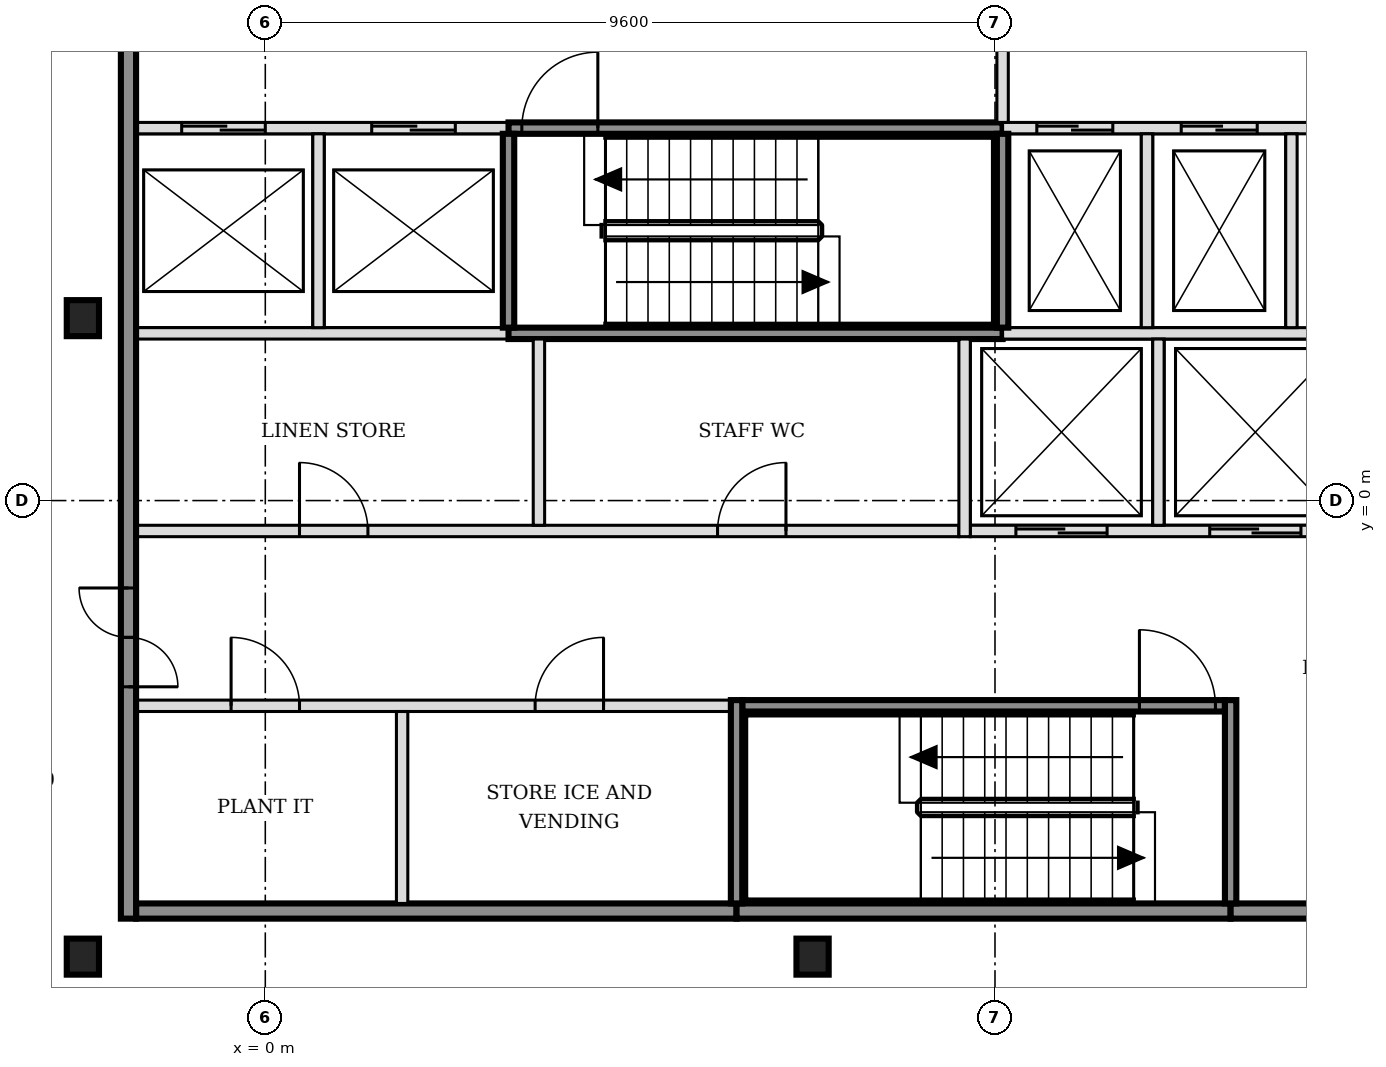
"""IFC4 building model, lengths in metres.
Left out: names, types, materials, properties, quantities, classifications, styles, units other than length and angle.
Written with IfcOpenShell. Run it as: python <this file> out.ifc"""

import sys

from ifc_helpers import new_model, si_unit, direction, frame, frame_2d, origin, origin_2d, place, context, subcontext, project, spatial, rectangle, i_section, extrude, element, fill, save


model = new_model("IFC4")
c1 = context("Model", 3, precision=1e-05, world=origin(), true_north=direction((0.0, 1.0)))
c2 = subcontext(c1, "Body", "Model", "MODEL_VIEW")
j1 = project(units=[si_unit("LENGTHUNIT", "METRE"), si_unit("PLANEANGLEUNIT", "RADIAN")], contexts=[c1])
p1 = place(None, origin())
s1 = spatial("IfcSite", under=j1, at=p1, CompositionType="ELEMENT")
p2 = place(p1, origin())
s2 = spatial("IfcBuilding", under=s1, at=p2, CompositionType="ELEMENT")
p3 = place(p2, frame((0.0, 0.0, 136.2)))
s3 = spatial("IfcBuildingStorey", under=s2, at=p3, CompositionType="ELEMENT", Elevation=136.2)
for number, where, z_axis, x_axis in (
    (1, (-2.4, -6.0, -0.15), (0.0, 0.0, 1.0), (1.0, 0.0, 0.0)),
    (2, (7.2, -6.0, -0.15), (0.0, 0.0, 1.0), (1.0, 0.0, 0.0)),
    (3, (-2.4, 2.4, -0.15), (0.0, 0.0, 1.0), (1.0, 0.0, 0.0)),
):
    element("IfcColumn", number, at=place(p3, frame(where, z_axis=z_axis, x_axis=x_axis)), inside=s3, PredefinedType="COLUMN", context=c2, shape_type="SweptSolid", body=[
        extrude(i_section(OverallWidth=0.424, OverallDepth=0.474, WebThickness=0.048, FlangeThickness=0.077, FilletRadius=0.015, at=origin_2d()), origin(), (0.0, 0.0, 1.0), 3.6),
    ])
p4 = place(p3, frame((-1.7, -5.4, 0.0), z_axis=(0.0, 0.0, 1.0), x_axis=(1.0, 0.0, 0.0)))
e4 = element("IfcWall", 4, at=p4, inside=s3, PredefinedType="SOLIDWALL", context=c2, shape_type="SweptSolid", body=[
    extrude(rectangle(XDim=7.9, YDim=0.2, at=frame_2d((3.95, 0.0))), origin(), (0.0, 0.0, 1.0), 3.45),
])
p5 = place(p3, frame((6.2, -5.4, 0.0), z_axis=(0.0, 0.0, 1.0), x_axis=(1.0, 0.0, 0.0)))
e5 = element("IfcWall", 5, at=p5, inside=s3, PredefinedType="SOLIDWALL", context=c2, shape_type="SweptSolid", body=[
    extrude(rectangle(XDim=6.5, YDim=0.2, at=frame_2d((3.25, 0.0))), origin(), (0.0, 0.0, 1.0), 3.45),
])
p6 = place(p3, frame((12.7, -5.4, 0.0), z_axis=(0.0, 0.0, 1.0), x_axis=(1.0, 0.0, 0.0)))
e6 = element("IfcWall", 6, at=p6, inside=s3, PredefinedType="SOLIDWALL", context=c2, shape_type="SweptSolid", body=[
    extrude(rectangle(XDim=3.4, YDim=0.2, at=frame_2d((1.7, 0.0))), origin(), (0.0, 0.0, 1.0), 3.45),
])
p7 = place(p3, frame((-1.7, -2.7, 0.0), z_axis=(0.0, 0.0, 1.0), x_axis=(1.0, 0.0, 0.0)))
e7 = element("IfcWall", 7, at=p7, inside=s3, PredefinedType="PARTITIONING", context=c2, shape_type="SweptSolid", body=[
    extrude(rectangle(XDim=7.825, YDim=0.15, at=frame_2d((3.913, 0.0))), origin(), (0.0, 0.0, 1.0), 3.45),
])
p8 = place(p7, frame((1.25, 0.0, 0.0)))
e8 = element("IfcOpeningElement", 8, at=p8, cuts=e7, PredefinedType="OPENING", context=c2, shape_type="SweptSolid", body=[
    extrude(rectangle(XDim=0.9, YDim=2.1, at=frame_2d((0.45, 1.05))), frame((0.0, 0.085, 0.0), z_axis=(0.0, -1.0, 0.0), x_axis=(1.0, 0.0, 0.0)), (0.0, 0.0, 1.0), 0.17),
])
p9 = place(p7, frame((5.25, 0.0, 0.0)))
e9 = element("IfcOpeningElement", 9, at=p9, cuts=e7, PredefinedType="OPENING", context=c2, shape_type="SweptSolid", body=[
    extrude(rectangle(XDim=0.9, YDim=2.1, at=frame_2d((0.45, 1.05))), frame((0.0, 0.085, 0.0), z_axis=(0.0, -1.0, 0.0), x_axis=(1.0, 0.0, 0.0)), (0.0, 0.0, 1.0), 0.17),
])
p10 = place(p3, frame((6.275, -2.7, 0.0), z_axis=(0.0, 0.0, 1.0), x_axis=(1.0, 0.0, 0.0)))
e10 = element("IfcWall", 10, at=p10, inside=s3, PredefinedType="SOLIDWALL", context=c2, shape_type="SweptSolid", body=[
    extrude(rectangle(XDim=6.35, YDim=0.15, at=frame_2d((3.175, 0.0))), origin(), (0.0, 0.0, 1.0), 3.45),
])
p11 = place(p10, frame((5.225, 0.0, 0.0)))
e11 = element("IfcOpeningElement", 11, at=p11, cuts=e10, PredefinedType="OPENING", context=c2, shape_type="SweptSolid", body=[
    extrude(rectangle(XDim=1.0, YDim=2.1, at=frame_2d((0.5, 1.05))), frame((0.0, 0.085, 0.0), z_axis=(0.0, -1.0, 0.0), x_axis=(1.0, 0.0, 0.0)), (0.0, 0.0, 1.0), 0.17),
])
p12 = place(p3, frame((-1.7, -0.4, 0.0), z_axis=(0.0, 0.0, 1.0), x_axis=(1.0, 0.0, 0.0)))
e12 = element("IfcWall", 12, at=p12, inside=s3, PredefinedType="PARTITIONING", context=c2, shape_type="SweptSolid", body=[
    extrude(rectangle(XDim=10.825, YDim=0.15, at=frame_2d((5.413, 0.0))), origin(), (0.0, 0.0, 1.0), 3.45),
])
p13 = place(p12, frame((2.15, 0.0, 0.0)))
e13 = element("IfcOpeningElement", 13, at=p13, cuts=e12, PredefinedType="OPENING", context=c2, shape_type="SweptSolid", body=[
    extrude(rectangle(XDim=0.9, YDim=2.1, at=frame_2d((0.45, 1.05))), frame((0.0, 0.085, 0.0), z_axis=(0.0, -1.0, 0.0), x_axis=(1.0, 0.0, 0.0)), (0.0, 0.0, 1.0), 0.17),
])
p14 = place(p12, frame((7.65, 0.0, 0.0)))
e14 = element("IfcOpeningElement", 14, at=p14, cuts=e12, PredefinedType="OPENING", context=c2, shape_type="SweptSolid", body=[
    extrude(rectangle(XDim=0.9, YDim=2.1, at=frame_2d((0.45, 1.05))), frame((0.0, 0.085, 0.0), z_axis=(0.0, -1.0, 0.0), x_axis=(1.0, 0.0, 0.0)), (0.0, 0.0, 1.0), 0.17),
])
p15 = place(p3, frame((9.275, -0.4, 0.0), z_axis=(0.0, 0.0, 1.0), x_axis=(1.0, 0.0, 0.0)))
e15 = element("IfcWall", 15, at=p15, inside=s3, PredefinedType="SOLIDWALL", context=c2, shape_type="SweptSolid", body=[
    extrude(rectangle(XDim=4.95, YDim=0.15, at=frame_2d((2.475, 0.0))), origin(), (0.0, 0.0, 1.0), 3.45),
])
p16 = place(p15, frame((0.6, 0.0, 0.0)))
e16 = element("IfcOpeningElement", 16, at=p16, cuts=e15, PredefinedType="OPENING", context=c2, shape_type="SweptSolid", body=[
    extrude(rectangle(XDim=1.2, YDim=2.1, at=frame_2d((0.6, 1.05))), frame((0.0, 0.085, 0.0), z_axis=(0.0, -1.0, 0.0), x_axis=(1.0, 0.0, 0.0)), (0.0, 0.0, 1.0), 0.17),
])
p17 = place(p15, frame((3.15, 0.0, 0.0)))
e17 = element("IfcOpeningElement", 17, at=p17, cuts=e15, PredefinedType="OPENING", context=c2, shape_type="SweptSolid", body=[
    extrude(rectangle(XDim=1.2, YDim=2.1, at=frame_2d((0.6, 1.05))), frame((0.0, 0.085, 0.0), z_axis=(0.0, -1.0, 0.0), x_axis=(1.0, 0.0, 0.0)), (0.0, 0.0, 1.0), 0.17),
])
p18 = place(p3, frame((-1.7, 2.2, 0.0), z_axis=(0.0, 0.0, 1.0), x_axis=(1.0, 0.0, 0.0)))
e18 = element("IfcWall", 18, at=p18, inside=s3, PredefinedType="SOLIDWALL", context=c2, shape_type="SweptSolid", body=[
    extrude(rectangle(XDim=4.9, YDim=0.15, at=frame_2d((2.45, 0.0))), origin(), (0.0, 0.0, 1.0), 3.45),
])
p19 = place(p3, frame((3.2, 2.2, 0.0), z_axis=(0.0, 0.0, 1.0), x_axis=(1.0, 0.0, 0.0)))
e19 = element("IfcWall", 19, at=p19, inside=s3, PredefinedType="SOLIDWALL", context=c2, shape_type="SweptSolid", body=[
    extrude(rectangle(XDim=6.5, YDim=0.15, at=frame_2d((3.25, 0.0))), origin(), (0.0, 0.0, 1.0), 3.45),
])
p20 = place(p3, frame((9.7, 2.2, 0.0), z_axis=(0.0, 0.0, 1.0), x_axis=(1.0, 0.0, 0.0)))
e20 = element("IfcWall", 20, at=p20, inside=s3, PredefinedType="SOLIDWALL", context=c2, shape_type="SweptSolid", body=[
    extrude(rectangle(XDim=4.525, YDim=0.15, at=frame_2d((2.263, 0.0))), origin(), (0.0, 0.0, 1.0), 3.45),
])
p21 = place(p3, frame((-1.7, 4.9, 0.0), z_axis=(0.0, 0.0, 1.0), x_axis=(1.0, 0.0, 0.0)))
e21 = element("IfcWall", 21, at=p21, inside=s3, PredefinedType="SOLIDWALL", context=c2, shape_type="SweptSolid", body=[
    extrude(rectangle(XDim=4.9, YDim=0.15, at=frame_2d((2.45, 0.0))), origin(), (0.0, 0.0, 1.0), 3.45),
])
p22 = place(p21, frame((0.6, 0.0, 0.0)))
e22 = element("IfcOpeningElement", 22, at=p22, cuts=e21, PredefinedType="OPENING", context=c2, shape_type="SweptSolid", body=[
    extrude(rectangle(XDim=1.1, YDim=2.1, at=frame_2d((0.55, 1.05))), frame((0.0, 0.085, 0.0), z_axis=(0.0, -1.0, 0.0), x_axis=(1.0, 0.0, 0.0)), (0.0, 0.0, 1.0), 0.17),
])
p23 = place(p21, frame((3.1, 0.0, 0.0)))
e23 = element("IfcOpeningElement", 23, at=p23, cuts=e21, PredefinedType="OPENING", context=c2, shape_type="SweptSolid", body=[
    extrude(rectangle(XDim=1.1, YDim=2.1, at=frame_2d((0.55, 1.05))), frame((0.0, 0.085, 0.0), z_axis=(0.0, -1.0, 0.0), x_axis=(1.0, 0.0, 0.0)), (0.0, 0.0, 1.0), 0.17),
])
p24 = place(p3, frame((3.2, 4.9, 0.0), z_axis=(0.0, 0.0, 1.0), x_axis=(1.0, 0.0, 0.0)))
e24 = element("IfcWall", 24, at=p24, inside=s3, PredefinedType="SOLIDWALL", context=c2, shape_type="SweptSolid", body=[
    extrude(rectangle(XDim=6.5, YDim=0.15, at=frame_2d((3.25, 0.0))), origin(), (0.0, 0.0, 1.0), 3.45),
])
p25 = place(p24, frame((0.175, 0.0, 0.0)))
e25 = element("IfcOpeningElement", 25, at=p25, cuts=e24, PredefinedType="OPENING", context=c2, shape_type="SweptSolid", body=[
    extrude(rectangle(XDim=1.0, YDim=2.1, at=frame_2d((0.5, 1.05))), frame((0.0, 0.085, 0.0), z_axis=(0.0, -1.0, 0.0), x_axis=(1.0, 0.0, 0.0)), (0.0, 0.0, 1.0), 0.17),
])
p26 = place(p3, frame((9.7, 4.9, 0.0), z_axis=(0.0, 0.0, 1.0), x_axis=(1.0, 0.0, 0.0)))
e26 = element("IfcWall", 26, at=p26, inside=s3, PredefinedType="SOLIDWALL", context=c2, shape_type="SweptSolid", body=[
    extrude(rectangle(XDim=6.4, YDim=0.15, at=frame_2d((3.2, 0.0))), origin(), (0.0, 0.0, 1.0), 3.45),
])
p27 = place(p26, frame((0.45, 0.0, 0.0)))
e27 = element("IfcOpeningElement", 27, at=p27, cuts=e26, PredefinedType="OPENING", context=c2, shape_type="SweptSolid", body=[
    extrude(rectangle(XDim=1.0, YDim=2.1, at=frame_2d((0.5, 1.05))), frame((0.0, 0.085, 0.0), z_axis=(0.0, -1.0, 0.0), x_axis=(1.0, 0.0, 0.0)), (0.0, 0.0, 1.0), 0.17),
])
p28 = place(p26, frame((2.35, 0.0, 0.0)))
e28 = element("IfcOpeningElement", 28, at=p28, cuts=e26, PredefinedType="OPENING", context=c2, shape_type="SweptSolid", body=[
    extrude(rectangle(XDim=1.0, YDim=2.1, at=frame_2d((0.5, 1.05))), frame((0.0, 0.085, 0.0), z_axis=(0.0, -1.0, 0.0), x_axis=(1.0, 0.0, 0.0)), (0.0, 0.0, 1.0), 0.17),
])
p29 = place(p26, frame((4.7, 0.0, 0.0)))
e29 = element("IfcOpeningElement", 29, at=p29, cuts=e26, PredefinedType="OPENING", context=c2, shape_type="SweptSolid", body=[
    extrude(rectangle(XDim=0.9, YDim=2.1, at=frame_2d((0.45, 1.05))), frame((0.0, 0.085, 0.0), z_axis=(0.0, -1.0, 0.0), x_axis=(1.0, 0.0, 0.0)), (0.0, 0.0, 1.0), 0.17),
])
p30 = place(p3, frame((-1.8, -5.5, 0.0), z_axis=(0.0, 0.0, 1.0), x_axis=(0.0, 1.0, 0.0)))
e30 = element("IfcWall", 30, at=p30, inside=s3, PredefinedType="SOLIDWALL", context=c2, shape_type="SweptSolid", body=[
    extrude(rectangle(XDim=15.8, YDim=0.2, at=frame_2d((7.9, 0.0))), origin(), (0.0, 0.0, 1.0), 3.45),
])
p31 = place(p30, frame((3.05, 0.0, 0.0)))
e31 = element("IfcOpeningElement", 31, at=p31, cuts=e30, PredefinedType="OPENING", context=c2, shape_type="SweptSolid", body=[
    extrude(rectangle(XDim=1.3, YDim=2.1, at=frame_2d((0.65, 1.05))), frame((0.0, 0.11, 0.0), z_axis=(0.0, -1.0, 0.0), x_axis=(1.0, 0.0, 0.0)), (0.0, 0.0, 1.0), 0.22),
])
p32 = place(p30, frame((11.45, 0.0, 0.0)))
e32 = element("IfcOpeningElement", 32, at=p32, cuts=e30, PredefinedType="OPENING", context=c2, shape_type="SweptSolid", body=[
    extrude(rectangle(XDim=1.3, YDim=2.1, at=frame_2d((0.65, 1.05))), frame((0.0, 0.11, 0.0), z_axis=(0.0, -1.0, 0.0), x_axis=(1.0, 0.0, 0.0)), (0.0, 0.0, 1.0), 0.22),
])
p33 = place(p3, frame((0.7, 2.275, 0.0), z_axis=(0.0, 0.0, 1.0), x_axis=(0.0, 1.0, 0.0)))
e33 = element("IfcWall", 33, at=p33, inside=s3, PredefinedType="SOLIDWALL", context=c2, shape_type="SweptSolid", body=[
    extrude(rectangle(XDim=2.55, YDim=0.15, at=frame_2d((1.275, 0.0))), origin(), (0.0, 0.0, 1.0), 3.45),
])
p34 = place(p3, frame((1.8, -5.3, 0.0), z_axis=(0.0, 0.0, 1.0), x_axis=(0.0, 1.0, 0.0)))
e34 = element("IfcWall", 34, at=p34, inside=s3, PredefinedType="PARTITIONING", context=c2, shape_type="SweptSolid", body=[
    extrude(rectangle(XDim=2.525, YDim=0.15, at=frame_2d((1.263, 0.0))), origin(), (0.0, 0.0, 1.0), 3.45),
])
p35 = place(p3, frame((3.2, 2.275, 0.0), z_axis=(0.0, 0.0, 1.0), x_axis=(0.0, 1.0, 0.0)))
e35 = element("IfcWall", 35, at=p35, inside=s3, PredefinedType="SOLIDWALL", context=c2, shape_type="SweptSolid", body=[
    extrude(rectangle(XDim=2.55, YDim=0.15, at=frame_2d((1.275, 0.0))), origin(), (0.0, 0.0, 1.0), 3.45),
])
p36 = place(p3, frame((3.6, -0.325, 0.0), z_axis=(0.0, 0.0, 1.0), x_axis=(0.0, 1.0, 0.0)))
e36 = element("IfcWall", 36, at=p36, inside=s3, PredefinedType="PARTITIONING", context=c2, shape_type="SweptSolid", body=[
    extrude(rectangle(XDim=2.45, YDim=0.15, at=frame_2d((1.225, 0.0))), origin(), (0.0, 0.0, 1.0), 3.45),
])
p37 = place(p3, frame((6.2, -5.3, 0.0), z_axis=(0.0, 0.0, 1.0), x_axis=(0.0, 1.0, 0.0)))
e37 = element("IfcWall", 37, at=p37, inside=s3, PredefinedType="SOLIDWALL", context=c2, shape_type="SweptSolid", body=[
    extrude(rectangle(XDim=2.675, YDim=0.15, at=frame_2d((1.337, 0.0))), origin(), (0.0, 0.0, 1.0), 3.45),
])
p38 = place(p3, frame((9.2, -0.475, 0.0), z_axis=(0.0, 0.0, 1.0), x_axis=(0.0, 1.0, 0.0)))
e38 = element("IfcWall", 38, at=p38, inside=s3, PredefinedType="SOLIDWALL", context=c2, shape_type="SweptSolid", body=[
    extrude(rectangle(XDim=2.6, YDim=0.15, at=frame_2d((1.3, 0.0))), origin(), (0.0, 0.0, 1.0), 3.45),
])
p39 = place(p3, frame((9.7, 2.275, 0.0), z_axis=(0.0, 0.0, 1.0), x_axis=(0.0, 1.0, 0.0)))
e39 = element("IfcWall", 39, at=p39, inside=s3, PredefinedType="SOLIDWALL", context=c2, shape_type="SweptSolid", body=[
    extrude(rectangle(XDim=2.55, YDim=0.15, at=frame_2d((1.275, 0.0))), origin(), (0.0, 0.0, 1.0), 3.45),
])
p40 = place(p3, frame((9.7, 4.975, 0.0), z_axis=(0.0, 0.0, 1.0), x_axis=(0.0, 1.0, 0.0)))
e40 = element("IfcWall", 40, at=p40, inside=s3, PredefinedType="SOLIDWALL", context=c2, shape_type="SweptSolid", body=[
    extrude(rectangle(XDim=2.45, YDim=0.15, at=frame_2d((1.225, 0.0))), origin(), (0.0, 0.0, 1.0), 3.45),
])
p41 = place(p3, frame((11.6, 2.275, 0.0), z_axis=(0.0, 0.0, 1.0), x_axis=(0.0, 1.0, 0.0)))
e41 = element("IfcWall", 41, at=p41, inside=s3, PredefinedType="SOLIDWALL", context=c2, shape_type="SweptSolid", body=[
    extrude(rectangle(XDim=2.55, YDim=0.15, at=frame_2d((1.275, 0.0))), origin(), (0.0, 0.0, 1.0), 3.45),
])
p42 = place(p3, frame((11.75, -0.325, 0.0), z_axis=(0.0, 0.0, 1.0), x_axis=(0.0, 1.0, 0.0)))
e42 = element("IfcWall", 42, at=p42, inside=s3, PredefinedType="SOLIDWALL", context=c2, shape_type="SweptSolid", body=[
    extrude(rectangle(XDim=2.45, YDim=0.15, at=frame_2d((1.225, 0.0))), origin(), (0.0, 0.0, 1.0), 3.45),
])
p43 = place(p3, frame((12.7, -5.3, 0.0), z_axis=(0.0, 0.0, 1.0), x_axis=(0.0, 1.0, 0.0)))
e43 = element("IfcWall", 43, at=p43, inside=s3, PredefinedType="SOLIDWALL", context=c2, shape_type="SweptSolid", body=[
    extrude(rectangle(XDim=2.675, YDim=0.15, at=frame_2d((1.337, 0.0))), origin(), (0.0, 0.0, 1.0), 3.45),
])
p44 = place(p3, frame((13.5, 2.275, 0.0), z_axis=(0.0, 0.0, 1.0), x_axis=(0.0, 1.0, 0.0)))
e44 = element("IfcWall", 44, at=p44, inside=s3, PredefinedType="SOLIDWALL", context=c2, shape_type="SweptSolid", body=[
    extrude(rectangle(XDim=2.55, YDim=0.15, at=frame_2d((1.275, 0.0))), origin(), (0.0, 0.0, 1.0), 3.45),
])
p45 = place(p16, origin())
e45 = element("IfcDoor", 45, at=p45, inside=s3, OperationType="DOUBLE_DOOR_SLIDING", PredefinedType="DOOR", context=c2, shape_type="SweptSolid", body=[
    extrude(rectangle(XDim=1.2, YDim=2.1, at=frame_2d((0.6, 1.05))), frame((0.0, 0.025, 0.0), z_axis=(0.0, -1.0, 0.0), x_axis=(1.0, 0.0, 0.0)), (0.0, 0.0, 1.0), 0.05),
])
fill(e16, e45)
p46 = place(p17, origin())
e46 = element("IfcDoor", 46, at=p46, inside=s3, OperationType="DOUBLE_DOOR_SLIDING", PredefinedType="DOOR", context=c2, shape_type="SweptSolid", body=[
    extrude(rectangle(XDim=1.2, YDim=2.1, at=frame_2d((0.6, 1.05))), frame((0.0, 0.025, 0.0), z_axis=(0.0, -1.0, 0.0), x_axis=(1.0, 0.0, 0.0)), (0.0, 0.0, 1.0), 0.05),
])
fill(e17, e46)
p47 = place(p22, origin())
e47 = element("IfcDoor", 47, at=p47, inside=s3, OperationType="DOUBLE_DOOR_SLIDING", PredefinedType="DOOR", context=c2, shape_type="SweptSolid", body=[
    extrude(rectangle(XDim=1.1, YDim=2.1, at=frame_2d((0.55, 1.05))), frame((0.0, 0.025, 0.0), z_axis=(0.0, -1.0, 0.0), x_axis=(1.0, 0.0, 0.0)), (0.0, 0.0, 1.0), 0.05),
])
fill(e22, e47)
p48 = place(p23, origin())
e48 = element("IfcDoor", 48, at=p48, inside=s3, OperationType="DOUBLE_DOOR_SLIDING", PredefinedType="DOOR", context=c2, shape_type="SweptSolid", body=[
    extrude(rectangle(XDim=1.1, YDim=2.1, at=frame_2d((0.55, 1.05))), frame((0.0, 0.025, 0.0), z_axis=(0.0, -1.0, 0.0), x_axis=(1.0, 0.0, 0.0)), (0.0, 0.0, 1.0), 0.05),
])
fill(e23, e48)
p49 = place(p27, origin())
e49 = element("IfcDoor", 49, at=p49, inside=s3, OperationType="DOUBLE_DOOR_SLIDING", PredefinedType="DOOR", context=c2, shape_type="SweptSolid", body=[
    extrude(rectangle(XDim=1.0, YDim=2.1, at=frame_2d((0.5, 1.05))), frame((0.0, 0.025, 0.0), z_axis=(0.0, -1.0, 0.0), x_axis=(1.0, 0.0, 0.0)), (0.0, 0.0, 1.0), 0.05),
])
fill(e27, e49)
p50 = place(p28, origin())
e50 = element("IfcDoor", 50, at=p50, inside=s3, OperationType="DOUBLE_DOOR_SLIDING", PredefinedType="DOOR", context=c2, shape_type="SweptSolid", body=[
    extrude(rectangle(XDim=1.0, YDim=2.1, at=frame_2d((0.5, 1.05))), frame((0.0, 0.025, 0.0), z_axis=(0.0, -1.0, 0.0), x_axis=(1.0, 0.0, 0.0)), (0.0, 0.0, 1.0), 0.05),
])
fill(e28, e50)
p51 = place(p11, origin())
e51 = element("IfcDoor", 51, at=p51, inside=s3, OperationType="SINGLE_SWING_LEFT", PredefinedType="DOOR", context=c2, shape_type="SweptSolid", body=[
    extrude(rectangle(XDim=1.0, YDim=2.1, at=frame_2d((0.5, 1.05))), frame((0.0, 0.025, 0.0), z_axis=(0.0, -1.0, 0.0), x_axis=(1.0, 0.0, 0.0)), (0.0, 0.0, 1.0), 0.05),
])
fill(e11, e51)
p52 = place(p25, origin())
e52 = element("IfcDoor", 52, at=p52, inside=s3, OperationType="SINGLE_SWING_RIGHT", PredefinedType="DOOR", context=c2, shape_type="SweptSolid", body=[
    extrude(rectangle(XDim=1.0, YDim=2.1, at=frame_2d((0.5, 1.05))), frame((0.0, 0.025, 0.0), z_axis=(0.0, -1.0, 0.0), x_axis=(1.0, 0.0, 0.0)), (0.0, 0.0, 1.0), 0.05),
])
fill(e25, e52)
p53 = place(p31, origin())
e53 = element("IfcDoor", 53, at=p53, inside=s3, OperationType="DOUBLE_DOOR_SINGLE_SWING", PredefinedType="DOOR", context=c2, shape_type="SweptSolid", body=[
    extrude(rectangle(XDim=1.3, YDim=2.1, at=frame_2d((0.65, 1.05))), frame((0.0, 0.025, 0.0), z_axis=(0.0, -1.0, 0.0), x_axis=(1.0, 0.0, 0.0)), (0.0, 0.0, 1.0), 0.05),
])
fill(e31, e53)
p54 = place(p8, origin())
e54 = element("IfcDoor", 54, at=p54, inside=s3, OperationType="SINGLE_SWING_LEFT", PredefinedType="DOOR", context=c2, shape_type="SweptSolid", body=[
    extrude(rectangle(XDim=0.9, YDim=2.1, at=frame_2d((0.45, 1.05))), frame((0.0, 0.025, 0.0), z_axis=(0.0, -1.0, 0.0), x_axis=(1.0, 0.0, 0.0)), (0.0, 0.0, 1.0), 0.05),
])
fill(e8, e54)
p55 = place(p9, origin())
e55 = element("IfcDoor", 55, at=p55, inside=s3, OperationType="SINGLE_SWING_RIGHT", PredefinedType="DOOR", context=c2, shape_type="SweptSolid", body=[
    extrude(rectangle(XDim=0.9, YDim=2.1, at=frame_2d((0.45, 1.05))), frame((0.0, 0.025, 0.0), z_axis=(0.0, -1.0, 0.0), x_axis=(1.0, 0.0, 0.0)), (0.0, 0.0, 1.0), 0.05),
])
fill(e9, e55)
p56 = place(p13, origin())
e56 = element("IfcDoor", 56, at=p56, inside=s3, OperationType="SINGLE_SWING_LEFT", PredefinedType="DOOR", context=c2, shape_type="SweptSolid", body=[
    extrude(rectangle(XDim=0.9, YDim=2.1, at=frame_2d((0.45, 1.05))), frame((0.0, 0.025, 0.0), z_axis=(0.0, -1.0, 0.0), x_axis=(1.0, 0.0, 0.0)), (0.0, 0.0, 1.0), 0.05),
])
fill(e13, e56)
p57 = place(p14, origin())
e57 = element("IfcDoor", 57, at=p57, inside=s3, OperationType="SINGLE_SWING_RIGHT", PredefinedType="DOOR", context=c2, shape_type="SweptSolid", body=[
    extrude(rectangle(XDim=0.9, YDim=2.1, at=frame_2d((0.45, 1.05))), frame((0.0, 0.025, 0.0), z_axis=(0.0, -1.0, 0.0), x_axis=(1.0, 0.0, 0.0)), (0.0, 0.0, 1.0), 0.05),
])
fill(e14, e57)
save(model, sys.argv[1])
